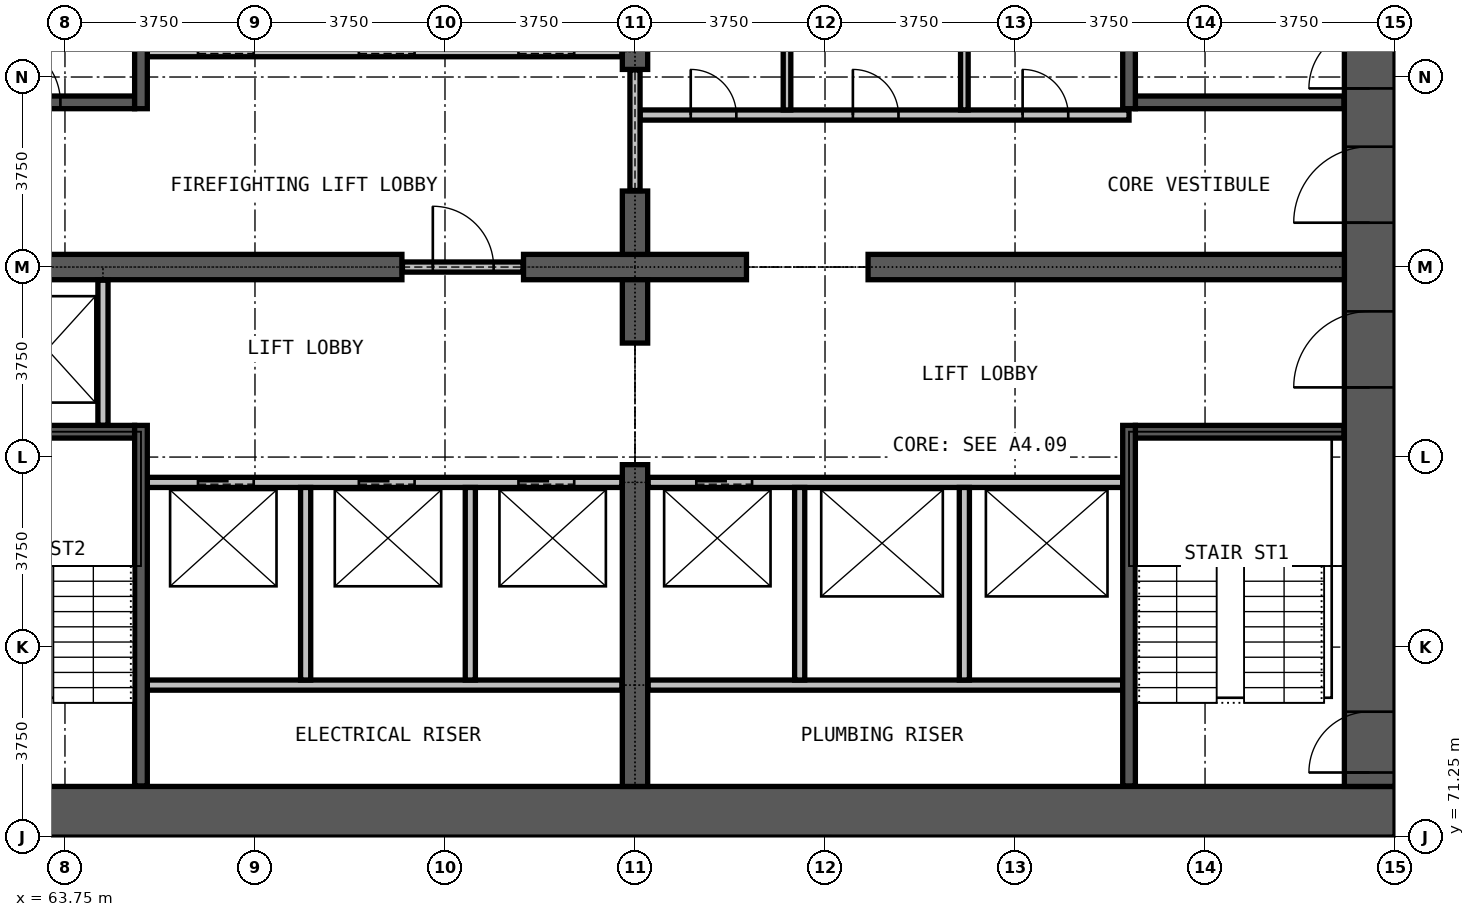
"""IFC4 building model, lengths in metres.
Left out: names, types, materials, properties, quantities, classifications, styles, units other than length and angle.
Written with IfcOpenShell. Run it as: python <this file> out.ifc"""

import sys

from ifc_helpers import new_model, si_unit, direction, frame, frame_2d, origin, place, context, subcontext, project, spatial, rectangle, extrude, element, fill, save


model = new_model("IFC4")
c1 = context("Model", 3, precision=1e-05, world=origin(), true_north=direction((0.0, 1.0)))
c2 = subcontext(c1, "Body", "Model", "MODEL_VIEW")
j1 = project(units=[si_unit("LENGTHUNIT", "METRE"), si_unit("PLANEANGLEUNIT", "RADIAN")], contexts=[c1])
p1 = place(None, origin())
s1 = spatial("IfcSite", under=j1, at=p1, CompositionType="ELEMENT")
p2 = place(p1, origin())
s2 = spatial("IfcBuilding", under=s1, at=p2, CompositionType="ELEMENT")
p3 = place(p2, frame((0.0, 0.0, 62.6)))
s3 = spatial("IfcBuildingStorey", under=s2, at=p3, CompositionType="ELEMENT", Elevation=62.6)
p4 = place(p3, frame((60.0, 71.75, 0.0), z_axis=(0.0, 0.0, 1.0), x_axis=(1.0, 0.0, 0.0)))
e1 = element("IfcWall", 1, at=p4, inside=s3, PredefinedType="SHEAR", context=c2, shape_type="SweptSolid", body=[
    extrude(rectangle(XDim=30.0, YDim=1.0, at=frame_2d((15.0, 0.0))), origin(), (0.0, 0.0, 1.0), 3.3),
])
p5 = place(p3, frame((89.5, 72.25, 0.0), z_axis=(0.0, 0.0, 1.0), x_axis=(0.0, 1.0, 0.0)))
e2 = element("IfcWall", 2, at=p5, inside=s3, PredefinedType="SHEAR", context=c2, shape_type="SweptSolid", body=[
    extrude(rectangle(XDim=20.5, YDim=1.0, at=frame_2d((10.25, 0.0))), origin(), (0.0, 0.0, 1.0), 3.3),
])
p6 = place(p5, frame((0.275, 0.0, 0.0)))
e3 = element("IfcOpeningElement", 3, at=p6, cuts=e2, PredefinedType="OPENING", context=c2, shape_type="SweptSolid", body=[
    extrude(rectangle(XDim=1.2, YDim=2.2, at=frame_2d((0.6, 1.1))), frame((0.0, 0.51, 0.0), z_axis=(0.0, -1.0, 0.0), x_axis=(1.0, 0.0, 0.0)), (0.0, 0.0, 1.0), 1.02),
])
p7 = place(p5, frame((13.775, 0.0, 0.0)))
e4 = element("IfcOpeningElement", 4, at=p7, cuts=e2, PredefinedType="OPENING", context=c2, shape_type="SweptSolid", body=[
    extrude(rectangle(XDim=1.2, YDim=2.2, at=frame_2d((0.6, 1.1))), frame((0.0, 0.51, 0.0), z_axis=(0.0, -1.0, 0.0), x_axis=(1.0, 0.0, 0.0)), (0.0, 0.0, 1.0), 1.02),
])
p8 = place(p5, frame((7.875, 0.0, 0.0)))
e5 = element("IfcOpeningElement", 5, at=p8, cuts=e2, PredefinedType="OPENING", context=c2, shape_type="SweptSolid", body=[
    extrude(rectangle(XDim=1.5, YDim=2.2, at=frame_2d((0.75, 1.1))), frame((0.0, 0.51, 0.0), z_axis=(0.0, -1.0, 0.0), x_axis=(1.0, 0.0, 0.0)), (0.0, 0.0, 1.0), 1.02),
])
p9 = place(p5, frame((11.125, 0.0, 0.0)))
e6 = element("IfcOpeningElement", 6, at=p9, cuts=e2, PredefinedType="OPENING", context=c2, shape_type="SweptSolid", body=[
    extrude(rectangle(XDim=1.5, YDim=2.2, at=frame_2d((0.75, 1.1))), frame((0.0, 0.51, 0.0), z_axis=(0.0, -1.0, 0.0), x_axis=(1.0, 0.0, 0.0)), (0.0, 0.0, 1.0), 1.02),
])
p10 = place(p3, frame((61.0, 82.5, 0.0), z_axis=(0.0, 0.0, 1.0), x_axis=(1.0, 0.0, 0.0)))
e7 = element("IfcWall", 7, at=p10, inside=s3, PredefinedType="SHEAR", context=c2, shape_type="SweptSolid", body=[
    extrude(rectangle(XDim=9.4, YDim=0.5, at=frame_2d((4.7, 0.0))), origin(), (0.0, 0.0, 1.0), 3.3),
])
p11 = place(p3, frame((72.8, 82.5, 0.0), z_axis=(0.0, 0.0, 1.0), x_axis=(1.0, 0.0, 0.0)))
e8 = element("IfcWall", 8, at=p11, inside=s3, PredefinedType="SHEAR", context=c2, shape_type="SweptSolid", body=[
    extrude(rectangle(XDim=4.4, YDim=0.5, at=frame_2d((2.2, 0.0))), origin(), (0.0, 0.0, 1.0), 3.3),
])
p12 = place(p3, frame((79.6, 82.5, 0.0), z_axis=(0.0, 0.0, 1.0), x_axis=(1.0, 0.0, 0.0)))
e9 = element("IfcWall", 9, at=p12, inside=s3, PredefinedType="SHEAR", context=c2, shape_type="SweptSolid", body=[
    extrude(rectangle(XDim=9.4, YDim=0.5, at=frame_2d((4.7, 0.0))), origin(), (0.0, 0.0, 1.0), 3.3),
])
p13 = place(p3, frame((75.0, 72.25, 0.0), z_axis=(0.0, 0.0, 1.0), x_axis=(0.0, 1.0, 0.0)))
e10 = element("IfcWall", 10, at=p13, inside=s3, PredefinedType="SHEAR", context=c2, shape_type="SweptSolid", body=[
    extrude(rectangle(XDim=6.35, YDim=0.5, at=frame_2d((3.175, 0.0))), origin(), (0.0, 0.0, 1.0), 3.3),
])
for number, where, z_axis, x_axis in (
    (11, (75.0, 81.0, 0.0), (0.0, 0.0, 1.0), (0.0, 1.0, 0.0)),
    (12, (75.0, 82.75, 0.0), (0.0, 0.0, 1.0), (0.0, 1.0, 0.0)),
):
    element("IfcWall", number, at=place(p3, frame(where, z_axis=z_axis, x_axis=x_axis)), inside=s3, PredefinedType="SHEAR", context=c2, shape_type="SweptSolid", body=[
        extrude(rectangle(XDim=1.25, YDim=0.5, at=frame_2d((0.625, 0.0))), origin(), (0.0, 0.0, 1.0), 3.3),
    ])
p14 = place(p3, frame((75.0, 86.4, 0.0), z_axis=(0.0, 0.0, 1.0), x_axis=(0.0, 1.0, 0.0)))
e13 = element("IfcWall", 13, at=p14, inside=s3, PredefinedType="SHEAR", context=c2, shape_type="SweptSolid", body=[
    extrude(rectangle(XDim=6.35, YDim=0.5, at=frame_2d((3.175, 0.0))), origin(), (0.0, 0.0, 1.0), 3.3),
])
p15 = place(p3, frame((70.41, 82.5, 0.0), z_axis=(0.0, 0.0, 1.0), x_axis=(1.0, 0.0, 0.0)))
e14 = element("IfcWall", 14, at=p15, inside=s3, PredefinedType="PARTITIONING", context=c2, shape_type="SweptSolid", body=[
    extrude(rectangle(XDim=2.38, YDim=0.2, at=frame_2d((1.19, 0.0))), origin(), (0.0, 0.0, 1.0), 2.4),
])
p16 = place(p15, frame((0.6, 0.0, 0.0)))
e15 = element("IfcOpeningElement", 15, at=p16, cuts=e14, PredefinedType="OPENING", context=c2, shape_type="SweptSolid", body=[
    extrude(rectangle(XDim=1.2, YDim=2.2, at=frame_2d((0.6, 1.1))), frame((0.0, 0.11, 0.0), z_axis=(0.0, -1.0, 0.0), x_axis=(1.0, 0.0, 0.0)), (0.0, 0.0, 1.0), 0.22),
])
p17 = place(p3, frame((75.1, 85.5, 0.0), z_axis=(0.0, 0.0, 1.0), x_axis=(1.0, 0.0, 0.0)))
e16 = element("IfcWall", 16, at=p17, inside=s3, PredefinedType="PARTITIONING", context=c2, shape_type="SweptSolid", body=[
    extrude(rectangle(XDim=9.65, YDim=0.2, at=frame_2d((4.825, 0.0))), origin(), (0.0, 0.0, 1.0), 3.0),
])
p18 = place(p17, frame((1.0, 0.0, 0.0)))
e17 = element("IfcOpeningElement", 17, at=p18, cuts=e16, PredefinedType="OPENING", context=c2, shape_type="SweptSolid", body=[
    extrude(rectangle(XDim=0.9, YDim=2.2, at=frame_2d((0.45, 1.1))), frame((0.0, 0.11, 0.0), z_axis=(0.0, -1.0, 0.0), x_axis=(1.0, 0.0, 0.0)), (0.0, 0.0, 1.0), 0.22),
])
p19 = place(p17, frame((4.2, 0.0, 0.0)))
e18 = element("IfcOpeningElement", 18, at=p19, cuts=e16, PredefinedType="OPENING", context=c2, shape_type="SweptSolid", body=[
    extrude(rectangle(XDim=0.9, YDim=2.2, at=frame_2d((0.45, 1.1))), frame((0.0, 0.11, 0.0), z_axis=(0.0, -1.0, 0.0), x_axis=(1.0, 0.0, 0.0)), (0.0, 0.0, 1.0), 0.22),
])
p20 = place(p17, frame((7.55, 0.0, 0.0)))
e19 = element("IfcOpeningElement", 19, at=p20, cuts=e16, PredefinedType="OPENING", context=c2, shape_type="SweptSolid", body=[
    extrude(rectangle(XDim=0.9, YDim=2.2, at=frame_2d((0.45, 1.1))), frame((0.0, 0.11, 0.0), z_axis=(0.0, -1.0, 0.0), x_axis=(1.0, 0.0, 0.0)), (0.0, 0.0, 1.0), 0.22),
])
p21 = place(p3, frame((75.0, 84.01, 0.0), z_axis=(0.0, 0.0, 1.0), x_axis=(0.0, 1.0, 0.0)))
e20 = element("IfcWall", 20, at=p21, inside=s3, PredefinedType="PARTITIONING", context=c2, shape_type="SweptSolid", body=[
    extrude(rectangle(XDim=2.38, YDim=0.2, at=frame_2d((1.19, 0.0))), origin(), (0.0, 0.0, 1.0), 2.4),
])
for number, where, z_axis, x_axis in (
    (21, (78.0, 85.6, 0.0), (0.0, 0.0, 1.0), (0.0, 1.0, 0.0)),
    (22, (81.5, 85.6, 0.0), (0.0, 0.0, 1.0), (0.0, 1.0, 0.0)),
):
    element("IfcWall", number, at=place(p3, frame(where, z_axis=z_axis, x_axis=x_axis)), inside=s3, PredefinedType="PARTITIONING", context=c2, shape_type="SweptSolid", body=[
        extrude(rectangle(XDim=5.05, YDim=0.15, at=frame_2d((2.525, 0.0))), origin(), (0.0, 0.0, 1.0), 3.0),
    ])
for number, where, z_axis, x_axis in (
    (23, (65.375, 74.25, 0.0), (0.0, 0.0, 1.0), (1.0, 0.0, 0.0)),
    (24, (75.26, 74.25, 0.0), (0.0, 0.0, 1.0), (1.0, 0.0, 0.0)),
):
    element("IfcWall", number, at=place(p3, frame(where, z_axis=z_axis, x_axis=x_axis)), inside=s3, PredefinedType="PARTITIONING", context=c2, shape_type="SweptSolid", body=[
        extrude(rectangle(XDim=9.365, YDim=0.2, at=frame_2d((4.683, 0.0))), origin(), (0.0, 0.0, 1.0), 3.0),
    ])
p22 = place(p3, frame((65.375, 78.25, 0.0), z_axis=(0.0, 0.0, 1.0), x_axis=(1.0, 0.0, 0.0)))
e25 = element("IfcWall", 25, at=p22, inside=s3, PredefinedType="PARTITIONING", context=c2, shape_type="SweptSolid", body=[
    extrude(rectangle(XDim=9.365, YDim=0.2, at=frame_2d((4.683, 0.0))), origin(), (0.0, 0.0, 1.0), 3.0),
])
p23 = place(p22, frame((1.0, 0.0, 0.0)))
e26 = element("IfcOpeningElement", 26, at=p23, cuts=e25, PredefinedType="OPENING", context=c2, shape_type="SweptSolid", body=[
    extrude(rectangle(XDim=1.1, YDim=2.2, at=frame_2d((0.55, 1.1))), frame((0.0, 0.11, 0.0), z_axis=(0.0, -1.0, 0.0), x_axis=(1.0, 0.0, 0.0)), (0.0, 0.0, 1.0), 0.22),
])
p24 = place(p22, frame((4.175, 0.0, 0.0)))
e27 = element("IfcOpeningElement", 27, at=p24, cuts=e25, PredefinedType="OPENING", context=c2, shape_type="SweptSolid", body=[
    extrude(rectangle(XDim=1.1, YDim=2.2, at=frame_2d((0.55, 1.1))), frame((0.0, 0.11, 0.0), z_axis=(0.0, -1.0, 0.0), x_axis=(1.0, 0.0, 0.0)), (0.0, 0.0, 1.0), 0.22),
])
p25 = place(p22, frame((7.325, 0.0, 0.0)))
e28 = element("IfcOpeningElement", 28, at=p25, cuts=e25, PredefinedType="OPENING", context=c2, shape_type="SweptSolid", body=[
    extrude(rectangle(XDim=1.1, YDim=2.2, at=frame_2d((0.55, 1.1))), frame((0.0, 0.11, 0.0), z_axis=(0.0, -1.0, 0.0), x_axis=(1.0, 0.0, 0.0)), (0.0, 0.0, 1.0), 0.22),
])
p26 = place(p3, frame((75.26, 78.25, 0.0), z_axis=(0.0, 0.0, 1.0), x_axis=(1.0, 0.0, 0.0)))
e29 = element("IfcWall", 29, at=p26, inside=s3, PredefinedType="PARTITIONING", context=c2, shape_type="SweptSolid", body=[
    extrude(rectangle(XDim=9.365, YDim=0.2, at=frame_2d((4.683, 0.0))), origin(), (0.0, 0.0, 1.0), 3.0),
])
p27 = place(p26, frame((0.95, 0.0, 0.0)))
e30 = element("IfcOpeningElement", 30, at=p27, cuts=e29, PredefinedType="OPENING", context=c2, shape_type="SweptSolid", body=[
    extrude(rectangle(XDim=1.1, YDim=2.2, at=frame_2d((0.55, 1.1))), frame((0.0, 0.11, 0.0), z_axis=(0.0, -1.0, 0.0), x_axis=(1.0, 0.0, 0.0)), (0.0, 0.0, 1.0), 0.22),
])
p28 = place(p3, frame((65.375, 86.75, 0.0), z_axis=(0.0, 0.0, 1.0), x_axis=(1.0, 0.0, 0.0)))
e31 = element("IfcWall", 31, at=p28, inside=s3, PredefinedType="PARTITIONING", context=c2, shape_type="SweptSolid", body=[
    extrude(rectangle(XDim=9.365, YDim=0.2, at=frame_2d((4.683, 0.0))), origin(), (0.0, 0.0, 1.0), 3.0),
])
p29 = place(p28, frame((1.0, 0.0, 0.0)))
e32 = element("IfcOpeningElement", 32, at=p29, cuts=e31, PredefinedType="OPENING", context=c2, shape_type="SweptSolid", body=[
    extrude(rectangle(XDim=1.1, YDim=2.2, at=frame_2d((0.55, 1.1))), frame((0.0, 0.11, 0.0), z_axis=(0.0, -1.0, 0.0), x_axis=(1.0, 0.0, 0.0)), (0.0, 0.0, 1.0), 0.22),
])
p30 = place(p28, frame((4.175, 0.0, 0.0)))
e33 = element("IfcOpeningElement", 33, at=p30, cuts=e31, PredefinedType="OPENING", context=c2, shape_type="SweptSolid", body=[
    extrude(rectangle(XDim=1.1, YDim=2.2, at=frame_2d((0.55, 1.1))), frame((0.0, 0.11, 0.0), z_axis=(0.0, -1.0, 0.0), x_axis=(1.0, 0.0, 0.0)), (0.0, 0.0, 1.0), 0.22),
])
p31 = place(p28, frame((7.325, 0.0, 0.0)))
e34 = element("IfcOpeningElement", 34, at=p31, cuts=e31, PredefinedType="OPENING", context=c2, shape_type="SweptSolid", body=[
    extrude(rectangle(XDim=1.1, YDim=2.2, at=frame_2d((0.55, 1.1))), frame((0.0, 0.11, 0.0), z_axis=(0.0, -1.0, 0.0), x_axis=(1.0, 0.0, 0.0)), (0.0, 0.0, 1.0), 0.22),
])
p32 = place(p3, frame((64.5, 79.375, 0.0), z_axis=(0.0, 0.0, 1.0), x_axis=(0.0, 1.0, 0.0)))
e35 = element("IfcWall", 35, at=p32, inside=s3, PredefinedType="PARTITIONING", context=c2, shape_type="SweptSolid", body=[
    extrude(rectangle(XDim=2.865, YDim=0.2, at=frame_2d((1.433, 0.0))), origin(), (0.0, 0.0, 1.0), 3.0),
])
for number, where, z_axis, x_axis in (
    (36, (68.5, 74.35, 0.0), (0.0, 0.0, 1.0), (0.0, 1.0, 0.0)),
    (37, (71.75, 74.35, 0.0), (0.0, 0.0, 1.0), (0.0, 1.0, 0.0)),
    (38, (78.25, 74.35, 0.0), (0.0, 0.0, 1.0), (0.0, 1.0, 0.0)),
    (39, (81.5, 74.35, 0.0), (0.0, 0.0, 1.0), (0.0, 1.0, 0.0)),
):
    element("IfcWall", number, at=place(p3, frame(where, z_axis=z_axis, x_axis=x_axis)), inside=s3, PredefinedType="PARTITIONING", context=c2, shape_type="SweptSolid", body=[
        extrude(rectangle(XDim=3.8, YDim=0.2, at=frame_2d((1.9, 0.0))), origin(), (0.0, 0.0, 1.0), 3.0),
    ])
for number, where, z_axis, x_axis in (
    (40, (61.01, 79.25, 0.0), (0.0, 0.0, 1.0), (1.0, 0.0, 0.0)),
    (41, (84.875, 79.25, 0.0), (0.0, 0.0, 1.0), (1.0, 0.0, 0.0)),
):
    element("IfcWall", number, at=place(p3, frame(where, z_axis=z_axis, x_axis=x_axis)), inside=s3, PredefinedType="PARTITIONING", context=c2, shape_type="SweptSolid", body=[
        extrude(rectangle(XDim=4.115, YDim=0.25, at=frame_2d((2.058, 0.0))), origin(), (0.0, 0.0, 1.0), 3.0),
    ])
p33 = place(p3, frame((61.01, 85.75, 0.0), z_axis=(0.0, 0.0, 1.0), x_axis=(1.0, 0.0, 0.0)))
e42 = element("IfcWall", 42, at=p33, inside=s3, PredefinedType="PARTITIONING", context=c2, shape_type="SweptSolid", body=[
    extrude(rectangle(XDim=4.115, YDim=0.25, at=frame_2d((2.058, 0.0))), origin(), (0.0, 0.0, 1.0), 3.0),
])
p34 = place(p33, frame((1.45, 0.0, 0.0)))
e43 = element("IfcOpeningElement", 43, at=p34, cuts=e42, PredefinedType="OPENING", context=c2, shape_type="SweptSolid", body=[
    extrude(rectangle(XDim=1.2, YDim=2.2, at=frame_2d((0.6, 1.1))), frame((0.0, 0.135, 0.0), z_axis=(0.0, -1.0, 0.0), x_axis=(1.0, 0.0, 0.0)), (0.0, 0.0, 1.0), 0.27),
])
p35 = place(p3, frame((84.875, 85.75, 0.0), z_axis=(0.0, 0.0, 1.0), x_axis=(1.0, 0.0, 0.0)))
e44 = element("IfcWall", 44, at=p35, inside=s3, PredefinedType="PARTITIONING", context=c2, shape_type="SweptSolid", body=[
    extrude(rectangle(XDim=4.115, YDim=0.25, at=frame_2d((2.058, 0.0))), origin(), (0.0, 0.0, 1.0), 3.0),
])
for number, where, z_axis, x_axis in (
    (45, (65.25, 72.26, 0.0), (0.0, 0.0, 1.0), (0.0, 1.0, 0.0)),
    (46, (65.25, 85.625, 0.0), (0.0, 0.0, 1.0), (0.0, 1.0, 0.0)),
    (47, (84.75, 72.26, 0.0), (0.0, 0.0, 1.0), (0.0, 1.0, 0.0)),
    (48, (84.75, 85.625, 0.0), (0.0, 0.0, 1.0), (0.0, 1.0, 0.0)),
):
    element("IfcWall", number, at=place(p3, frame(where, z_axis=z_axis, x_axis=x_axis)), inside=s3, PredefinedType="PARTITIONING", context=c2, shape_type="SweptSolid", body=[
        extrude(rectangle(XDim=7.115, YDim=0.25, at=frame_2d((3.558, 0.0))), origin(), (0.0, 0.0, 1.0), 3.0),
    ])
p36 = place(p23, origin())
e49 = element("IfcDoor", 49, at=p36, inside=s3, OperationType="DOUBLE_DOOR_SLIDING", PredefinedType="DOOR", context=c2, shape_type="SweptSolid", body=[
    extrude(rectangle(XDim=1.1, YDim=2.2, at=frame_2d((0.55, 1.1))), frame((0.0, 0.025, 0.0), z_axis=(0.0, -1.0, 0.0), x_axis=(1.0, 0.0, 0.0)), (0.0, 0.0, 1.0), 0.05),
])
fill(e26, e49)
p37 = place(p24, origin())
e50 = element("IfcDoor", 50, at=p37, inside=s3, OperationType="DOUBLE_DOOR_SLIDING", PredefinedType="DOOR", context=c2, shape_type="SweptSolid", body=[
    extrude(rectangle(XDim=1.1, YDim=2.2, at=frame_2d((0.55, 1.1))), frame((0.0, 0.025, 0.0), z_axis=(0.0, -1.0, 0.0), x_axis=(1.0, 0.0, 0.0)), (0.0, 0.0, 1.0), 0.05),
])
fill(e27, e50)
p38 = place(p25, origin())
e51 = element("IfcDoor", 51, at=p38, inside=s3, OperationType="DOUBLE_DOOR_SLIDING", PredefinedType="DOOR", context=c2, shape_type="SweptSolid", body=[
    extrude(rectangle(XDim=1.1, YDim=2.2, at=frame_2d((0.55, 1.1))), frame((0.0, 0.025, 0.0), z_axis=(0.0, -1.0, 0.0), x_axis=(1.0, 0.0, 0.0)), (0.0, 0.0, 1.0), 0.05),
])
fill(e28, e51)
p39 = place(p27, origin())
e52 = element("IfcDoor", 52, at=p39, inside=s3, OperationType="DOUBLE_DOOR_SLIDING", PredefinedType="DOOR", context=c2, shape_type="SweptSolid", body=[
    extrude(rectangle(XDim=1.1, YDim=2.2, at=frame_2d((0.55, 1.1))), frame((0.0, 0.025, 0.0), z_axis=(0.0, -1.0, 0.0), x_axis=(1.0, 0.0, 0.0)), (0.0, 0.0, 1.0), 0.05),
])
fill(e30, e52)
p40 = place(p29, origin())
e53 = element("IfcDoor", 53, at=p40, inside=s3, OperationType="DOUBLE_DOOR_SLIDING", PredefinedType="DOOR", context=c2, shape_type="SweptSolid", body=[
    extrude(rectangle(XDim=1.1, YDim=2.2, at=frame_2d((0.55, 1.1))), frame((0.0, 0.025, 0.0), z_axis=(0.0, -1.0, 0.0), x_axis=(1.0, 0.0, 0.0)), (0.0, 0.0, 1.0), 0.05),
])
fill(e32, e53)
p41 = place(p30, origin())
e54 = element("IfcDoor", 54, at=p41, inside=s3, OperationType="DOUBLE_DOOR_SLIDING", PredefinedType="DOOR", context=c2, shape_type="SweptSolid", body=[
    extrude(rectangle(XDim=1.1, YDim=2.2, at=frame_2d((0.55, 1.1))), frame((0.0, 0.025, 0.0), z_axis=(0.0, -1.0, 0.0), x_axis=(1.0, 0.0, 0.0)), (0.0, 0.0, 1.0), 0.05),
])
fill(e33, e54)
p42 = place(p31, origin())
e55 = element("IfcDoor", 55, at=p42, inside=s3, OperationType="DOUBLE_DOOR_SLIDING", PredefinedType="DOOR", context=c2, shape_type="SweptSolid", body=[
    extrude(rectangle(XDim=1.1, YDim=2.2, at=frame_2d((0.55, 1.1))), frame((0.0, 0.025, 0.0), z_axis=(0.0, -1.0, 0.0), x_axis=(1.0, 0.0, 0.0)), (0.0, 0.0, 1.0), 0.05),
])
fill(e34, e55)
p43 = place(p16, origin())
e56 = element("IfcDoor", 56, at=p43, inside=s3, OperationType="SINGLE_SWING_RIGHT", PredefinedType="DOOR", context=c2, shape_type="SweptSolid", body=[
    extrude(rectangle(XDim=1.2, YDim=2.2, at=frame_2d((0.6, 1.1))), frame((0.0, 0.025, 0.0), z_axis=(0.0, -1.0, 0.0), x_axis=(1.0, 0.0, 0.0)), (0.0, 0.0, 1.0), 0.05),
])
fill(e15, e56)
p44 = place(p34, origin())
e57 = element("IfcDoor", 57, at=p44, inside=s3, OperationType="SINGLE_SWING_RIGHT", PredefinedType="DOOR", context=c2, shape_type="SweptSolid", body=[
    extrude(rectangle(XDim=1.2, YDim=2.2, at=frame_2d((0.6, 1.1))), frame((0.0, 0.025, 0.0), z_axis=(0.0, -1.0, 0.0), x_axis=(1.0, 0.0, 0.0)), (0.0, 0.0, 1.0), 0.05),
])
fill(e43, e57)
p45 = place(p6, origin())
e58 = element("IfcDoor", 58, at=p45, inside=s3, OperationType="SINGLE_SWING_LEFT", PredefinedType="DOOR", context=c2, shape_type="SweptSolid", body=[
    extrude(rectangle(XDim=1.2, YDim=2.2, at=frame_2d((0.6, 1.1))), frame((0.0, 0.025, 0.0), z_axis=(0.0, -1.0, 0.0), x_axis=(1.0, 0.0, 0.0)), (0.0, 0.0, 1.0), 0.05),
])
fill(e3, e58)
p46 = place(p7, origin())
e59 = element("IfcDoor", 59, at=p46, inside=s3, OperationType="SINGLE_SWING_LEFT", PredefinedType="DOOR", context=c2, shape_type="SweptSolid", body=[
    extrude(rectangle(XDim=1.2, YDim=2.2, at=frame_2d((0.6, 1.1))), frame((0.0, 0.025, 0.0), z_axis=(0.0, -1.0, 0.0), x_axis=(1.0, 0.0, 0.0)), (0.0, 0.0, 1.0), 0.05),
])
fill(e4, e59)
p47 = place(p8, origin())
e60 = element("IfcDoor", 60, at=p47, inside=s3, OperationType="DOUBLE_DOOR_SINGLE_SWING", PredefinedType="DOOR", context=c2, shape_type="SweptSolid", body=[
    extrude(rectangle(XDim=1.5, YDim=2.2, at=frame_2d((0.75, 1.1))), frame((0.0, 0.025, 0.0), z_axis=(0.0, -1.0, 0.0), x_axis=(1.0, 0.0, 0.0)), (0.0, 0.0, 1.0), 0.05),
])
fill(e5, e60)
p48 = place(p9, origin())
e61 = element("IfcDoor", 61, at=p48, inside=s3, OperationType="DOUBLE_DOOR_SINGLE_SWING", PredefinedType="DOOR", context=c2, shape_type="SweptSolid", body=[
    extrude(rectangle(XDim=1.5, YDim=2.2, at=frame_2d((0.75, 1.1))), frame((0.0, 0.025, 0.0), z_axis=(0.0, -1.0, 0.0), x_axis=(1.0, 0.0, 0.0)), (0.0, 0.0, 1.0), 0.05),
])
fill(e6, e61)
p49 = place(p18, origin())
e62 = element("IfcDoor", 62, at=p49, inside=s3, OperationType="SINGLE_SWING_RIGHT", PredefinedType="DOOR", context=c2, shape_type="SweptSolid", body=[
    extrude(rectangle(XDim=0.9, YDim=2.2, at=frame_2d((0.45, 1.1))), frame((0.0, 0.025, 0.0), z_axis=(0.0, -1.0, 0.0), x_axis=(1.0, 0.0, 0.0)), (0.0, 0.0, 1.0), 0.05),
])
fill(e17, e62)
p50 = place(p19, origin())
e63 = element("IfcDoor", 63, at=p50, inside=s3, OperationType="SINGLE_SWING_RIGHT", PredefinedType="DOOR", context=c2, shape_type="SweptSolid", body=[
    extrude(rectangle(XDim=0.9, YDim=2.2, at=frame_2d((0.45, 1.1))), frame((0.0, 0.025, 0.0), z_axis=(0.0, -1.0, 0.0), x_axis=(1.0, 0.0, 0.0)), (0.0, 0.0, 1.0), 0.05),
])
fill(e18, e63)
p51 = place(p20, origin())
e64 = element("IfcDoor", 64, at=p51, inside=s3, OperationType="SINGLE_SWING_RIGHT", PredefinedType="DOOR", context=c2, shape_type="SweptSolid", body=[
    extrude(rectangle(XDim=0.9, YDim=2.2, at=frame_2d((0.45, 1.1))), frame((0.0, 0.025, 0.0), z_axis=(0.0, -1.0, 0.0), x_axis=(1.0, 0.0, 0.0)), (0.0, 0.0, 1.0), 0.05),
])
fill(e19, e64)
save(model, sys.argv[1])
